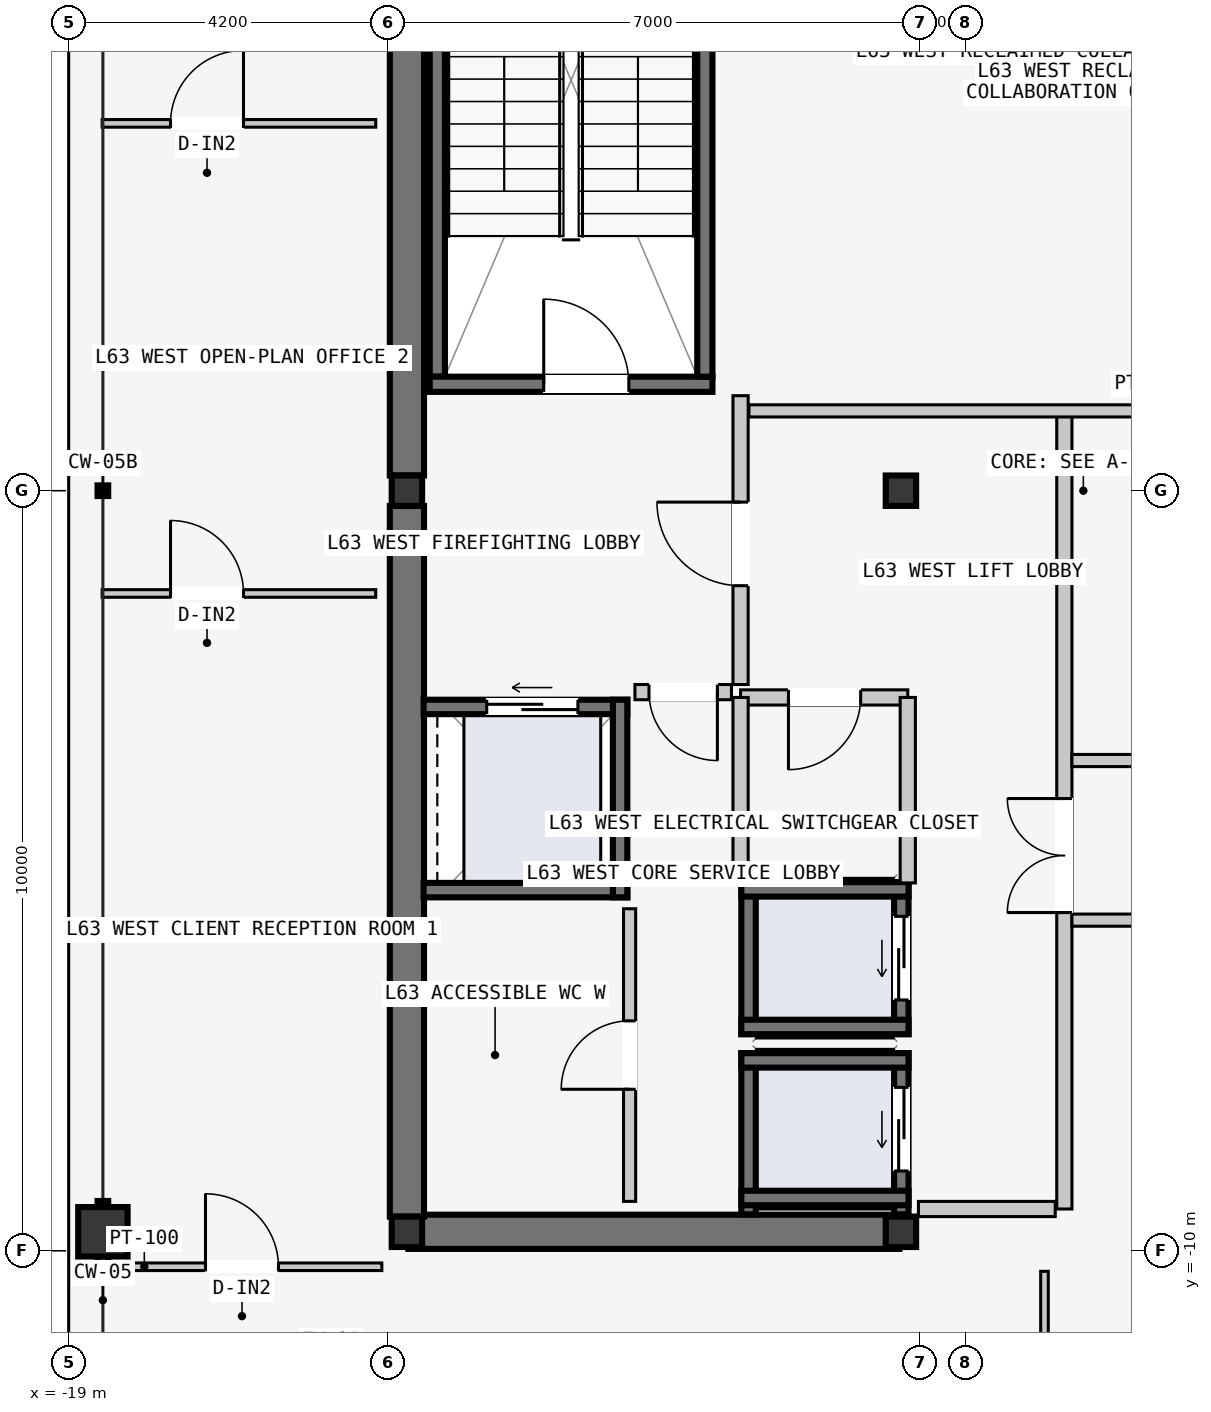
"""IFC4 building model, lengths in metres.
Left out: names, types, materials, properties, quantities, classifications, styles, units other than length and angle.
Written with IfcOpenShell. Run it as: python <this file> out.ifc"""

import sys

from ifc_helpers import new_model, si_unit, direction, frame, frame_2d, origin, origin_2d, place, context, subcontext, project, spatial, rectangle, hollow_rectangle, i_section, extrude, element, fill, save


model = new_model("IFC4")
c1 = context("Model", 3, precision=1e-05, world=origin(), true_north=direction((0.0, 1.0)))
c2 = subcontext(c1, "Body", "Model", "MODEL_VIEW")
j1 = project(units=[si_unit("LENGTHUNIT", "METRE"), si_unit("PLANEANGLEUNIT", "RADIAN")], contexts=[c1])
p1 = place(None, origin())
s1 = spatial("IfcSite", under=j1, at=p1, CompositionType="ELEMENT")
p2 = place(p1, origin())
s2 = spatial("IfcBuilding", under=s1, at=p2, CompositionType="ELEMENT")
p3 = place(p2, frame((0.0, 0.0, 240.0)))
s3 = spatial("IfcBuildingStorey", under=s2, at=p3, CompositionType="ELEMENT", Elevation=240.0)
p4 = place(p3, frame((-14.53, -9.75, -0.2), z_axis=(0.0, 0.0, 1.0), x_axis=(1.0, 0.0, 0.0)))
e1 = element("IfcWall", 1, at=p4, inside=s3, PredefinedType="SHEAR", context=c2, shape_type="SweptSolid", body=[
    extrude(rectangle(XDim=6.46, YDim=0.45, at=frame_2d((3.23, 0.0))), origin(), (0.0, 0.0, 1.0), 3.6),
])
for number, where, z_axis, x_axis in (
    (2, (-14.55, -9.55, -0.2), (0.0, 0.0, 1.0), (0.0, 1.0, 0.0)),
    (3, (-14.55, 0.2, -0.2), (0.0, 0.0, 1.0), (0.0, 1.0, 0.0)),
):
    element("IfcWall", number, at=place(p3, frame(where, z_axis=z_axis, x_axis=x_axis)), inside=s3, PredefinedType="SHEAR", context=c2, shape_type="SweptSolid", body=[
        extrude(rectangle(XDim=9.35, YDim=0.45, at=frame_2d((4.675, 0.0))), origin(), (0.0, 0.0, 1.0), 3.6),
    ])
p5 = place(p3, frame((-14.15, 1.5, -0.2), z_axis=(0.0, 0.0, 1.0), x_axis=(0.0, 1.0, 0.0)))
e4 = element("IfcWall", 4, at=p5, inside=s3, PredefinedType="SOLIDWALL", context=c2, shape_type="SweptSolid", body=[
    extrude(rectangle(XDim=7.8, YDim=0.2, at=frame_2d((3.9, 0.0))), origin(), (0.0, 0.0, 1.0), 3.6),
])
p6 = place(p3, frame((-14.25, 1.4, -0.2), z_axis=(0.0, 0.0, 1.0), x_axis=(1.0, 0.0, 0.0)))
e5 = element("IfcWall", 5, at=p6, inside=s3, PredefinedType="SOLIDWALL", context=c2, shape_type="SweptSolid", body=[
    extrude(rectangle(XDim=3.72, YDim=0.2, at=frame_2d((1.86, 0.0))), origin(), (0.0, 0.0, 1.0), 3.6),
])
p7 = place(p6, frame((1.5, 0.0, 0.2)))
e6 = element("IfcOpeningElement", 6, at=p7, cuts=e5, PredefinedType="OPENING", context=c2, shape_type="SweptSolid", body=[
    extrude(rectangle(XDim=1.12, YDim=2.18, at=frame_2d((0.56, 1.09))), frame((0.0, 0.11, 0.0), z_axis=(0.0, -1.0, 0.0), x_axis=(1.0, 0.0, 0.0)), (0.0, 0.0, 1.0), 0.22),
])
p8 = place(p3, frame((-10.63, 1.5, -0.2), z_axis=(0.0, 0.0, 1.0), x_axis=(0.0, 1.0, 0.0)))
e7 = element("IfcWall", 7, at=p8, inside=s3, PredefinedType="SOLIDWALL", context=c2, shape_type="SweptSolid", body=[
    extrude(rectangle(XDim=7.8, YDim=0.2, at=frame_2d((3.9, 0.0))), origin(), (0.0, 0.0, 1.0), 3.6),
])
for number, where, z_axis, x_axis in (
    (8, (-14.55, -9.75, 0.0), (0.0, 0.0, 1.0), (1.0, 0.0, 0.0)),
    (9, (-14.55, 0.0, 0.0), (0.0, 0.0, 1.0), (1.0, 0.0, 0.0)),
    (10, (-8.05, -9.75, 0.0), (0.0, 0.0, 1.0), (1.0, 0.0, 0.0)),
    (11, (-8.05, 0.0, 0.0), (0.0, 0.0, 1.0), (1.0, 0.0, 0.0)),
):
    element("IfcColumn", number, at=place(p3, frame(where, z_axis=z_axis, x_axis=x_axis)), inside=s3, PredefinedType="COLUMN", context=c2, shape_type="SweptSolid", body=[
        extrude(i_section(OverallWidth=0.4, OverallDepth=0.4, WebThickness=0.013, FlangeThickness=0.021, at=origin_2d()), origin(), (0.0, 0.0, 1.0), 3.6),
    ])
p9 = place(p3, frame((-18.55, -9.75, 0.0), z_axis=(0.0, 0.0, 1.0), x_axis=(0.0, 1.0, 0.0)))
e12 = element("IfcColumn", 12, at=p9, inside=s3, PredefinedType="COLUMN", context=c2, shape_type="SweptSolid", body=[
    extrude(hollow_rectangle(XDim=0.65, YDim=0.65, WallThickness=0.028, at=origin_2d()), origin(), (0.0, 0.0, 1.0), 3.6),
])
p10 = place(p3, frame((-8.045, -9.52, -0.2), z_axis=(0.0, 0.0, 1.0), x_axis=(0.0, 1.0, 0.0)))
e13 = element("IfcWall", 13, at=p10, inside=s3, PredefinedType="SOLIDWALL", context=c2, shape_type="SweptSolid", body=[
    extrude(rectangle(XDim=2.12, YDim=0.19, at=frame_2d((1.06, 0.0))), origin(), (0.0, 0.0, 1.0), 3.6),
])
p11 = place(p10, frame((0.57, 0.0, 0.2)))
e14 = element("IfcOpeningElement", 14, at=p11, cuts=e13, PredefinedType="OPENING", context=c2, shape_type="SweptSolid", body=[
    extrude(rectangle(XDim=1.1, YDim=2.2, at=frame_2d((0.55, 1.1))), frame((0.0, 0.105, 0.0), z_axis=(0.0, -1.0, 0.0), x_axis=(1.0, 0.0, 0.0)), (0.0, 0.0, 1.0), 0.21),
])
p12 = place(p3, frame((-10.055, -9.52, -0.2), z_axis=(0.0, 0.0, 1.0), x_axis=(0.0, 1.0, 0.0)))
e15 = element("IfcWall", 15, at=p12, inside=s3, PredefinedType="SOLIDWALL", context=c2, shape_type="SweptSolid", body=[
    extrude(rectangle(XDim=2.12, YDim=0.19, at=frame_2d((1.06, 0.0))), origin(), (0.0, 0.0, 1.0), 3.6),
])
for number, where, z_axis, x_axis in (
    (16, (-10.15, -7.495, -0.2), (0.0, 0.0, 1.0), (1.0, 0.0, 0.0)),
    (17, (-10.15, -9.305, -0.2), (0.0, 0.0, 1.0), (1.0, 0.0, 0.0)),
):
    element("IfcWall", number, at=place(p3, frame(where, z_axis=z_axis, x_axis=x_axis)), inside=s3, PredefinedType="SOLIDWALL", context=c2, shape_type="SweptSolid", body=[
        extrude(rectangle(XDim=2.2, YDim=0.19, at=frame_2d((1.1, 0.0))), origin(), (0.0, 0.0, 1.0), 3.6),
    ])
p13 = place(p3, frame((-8.045, -7.15, -0.2), z_axis=(0.0, 0.0, 1.0), x_axis=(0.0, 1.0, 0.0)))
e18 = element("IfcWall", 18, at=p13, inside=s3, PredefinedType="SOLIDWALL", context=c2, shape_type="SweptSolid", body=[
    extrude(rectangle(XDim=2.0, YDim=0.19, at=frame_2d((1.0, 0.0))), origin(), (0.0, 0.0, 1.0), 3.6),
])
p14 = place(p13, frame((0.45, 0.0, 0.2)))
e19 = element("IfcOpeningElement", 19, at=p14, cuts=e18, PredefinedType="OPENING", context=c2, shape_type="SweptSolid", body=[
    extrude(rectangle(XDim=1.1, YDim=2.2, at=frame_2d((0.55, 1.1))), frame((0.0, 0.105, 0.0), z_axis=(0.0, -1.0, 0.0), x_axis=(1.0, 0.0, 0.0)), (0.0, 0.0, 1.0), 0.21),
])
p15 = place(p3, frame((-10.055, -7.15, -0.2), z_axis=(0.0, 0.0, 1.0), x_axis=(0.0, 1.0, 0.0)))
e20 = element("IfcWall", 20, at=p15, inside=s3, PredefinedType="SOLIDWALL", context=c2, shape_type="SweptSolid", body=[
    extrude(rectangle(XDim=2.0, YDim=0.19, at=frame_2d((1.0, 0.0))), origin(), (0.0, 0.0, 1.0), 3.6),
])
for number, where, z_axis, x_axis in (
    (21, (-10.15, -5.245, -0.2), (0.0, 0.0, 1.0), (1.0, 0.0, 0.0)),
    (22, (-10.15, -7.055, -0.2), (0.0, 0.0, 1.0), (1.0, 0.0, 0.0)),
):
    element("IfcWall", number, at=place(p3, frame(where, z_axis=z_axis, x_axis=x_axis)), inside=s3, PredefinedType="SOLIDWALL", context=c2, shape_type="SweptSolid", body=[
        extrude(rectangle(XDim=2.2, YDim=0.19, at=frame_2d((1.1, 0.0))), origin(), (0.0, 0.0, 1.0), 3.6),
    ])
p16 = place(p3, frame((-14.33, -2.845, -0.2), z_axis=(0.0, 0.0, 1.0), x_axis=(1.0, 0.0, 0.0)))
e23 = element("IfcWall", 23, at=p16, inside=s3, PredefinedType="SOLIDWALL", context=c2, shape_type="SweptSolid", body=[
    extrude(rectangle(XDim=2.68, YDim=0.19, at=frame_2d((1.34, 0.0))), origin(), (0.0, 0.0, 1.0), 3.6),
])
p17 = place(p16, frame((0.83, 0.0, 0.2)))
e24 = element("IfcOpeningElement", 24, at=p17, cuts=e23, PredefinedType="OPENING", context=c2, shape_type="SweptSolid", body=[
    extrude(rectangle(XDim=1.2, YDim=2.2, at=frame_2d((0.6, 1.1))), frame((0.0, 0.105, 0.0), z_axis=(0.0, -1.0, 0.0), x_axis=(1.0, 0.0, 0.0)), (0.0, 0.0, 1.0), 0.21),
])
p18 = place(p3, frame((-14.33, -5.255, -0.2), z_axis=(0.0, 0.0, 1.0), x_axis=(1.0, 0.0, 0.0)))
e25 = element("IfcWall", 25, at=p18, inside=s3, PredefinedType="SOLIDWALL", context=c2, shape_type="SweptSolid", body=[
    extrude(rectangle(XDim=2.68, YDim=0.19, at=frame_2d((1.34, 0.0))), origin(), (0.0, 0.0, 1.0), 3.6),
])
p19 = place(p3, frame((-11.745, -5.35, -0.2), z_axis=(0.0, 0.0, 1.0), x_axis=(0.0, 1.0, 0.0)))
e26 = element("IfcWall", 26, at=p19, inside=s3, PredefinedType="SOLIDWALL", context=c2, shape_type="SweptSolid", body=[
    extrude(rectangle(XDim=2.6, YDim=0.19, at=frame_2d((1.3, 0.0))), origin(), (0.0, 0.0, 1.0), 3.6),
])
p20 = place(p3, frame((-5.9, -9.45, 0.0), z_axis=(0.0, 0.0, 1.0), x_axis=(0.0, 1.0, 0.0)))
e27 = element("IfcWall", 27, at=p20, inside=s3, PredefinedType="PARTITIONING", context=c2, shape_type="SweptSolid", body=[
    extrude(rectangle(XDim=10.5, YDim=0.2, at=frame_2d((5.25, 0.0))), origin(), (0.0, 0.0, 1.0), 3.4),
])
p21 = place(p20, frame((3.9, 0.0, 0.0)))
e28 = element("IfcOpeningElement", 28, at=p21, cuts=e27, PredefinedType="OPENING", context=c2, shape_type="SweptSolid", body=[
    extrude(rectangle(XDim=1.5, YDim=2.2, at=frame_2d((0.75, 1.1))), frame((0.0, 0.11, 0.0), z_axis=(0.0, -1.0, 0.0), x_axis=(1.0, 0.0, 0.0)), (0.0, 0.0, 1.0), 0.22),
])
p22 = place(p3, frame((-6.02, -9.45, 0.0), z_axis=(0.0, 0.0, 1.0), x_axis=(-1.0, 0.0, 0.0)))
e29 = element("IfcWall", 29, at=p22, inside=s3, PredefinedType="PARTITIONING", context=c2, shape_type="SweptSolid", body=[
    extrude(rectangle(XDim=1.8, YDim=0.2, at=frame_2d((0.9, 0.0))), origin(), (0.0, 0.0, 1.0), 3.4),
])
p23 = place(p3, frame((-10.16, -2.55, 0.0), z_axis=(0.0, 0.0, 1.0), x_axis=(0.0, 1.0, 0.0)))
e30 = element("IfcWall", 30, at=p23, inside=s3, PredefinedType="PARTITIONING", context=c2, shape_type="SweptSolid", body=[
    extrude(rectangle(XDim=3.8, YDim=0.2, at=frame_2d((1.9, 0.0))), origin(), (0.0, 0.0, 1.0), 3.4),
])
p24 = place(p23, frame((1.3, 0.0, 0.0)))
e31 = element("IfcOpeningElement", 31, at=p24, cuts=e30, PredefinedType="OPENING", context=c2, shape_type="SweptSolid", body=[
    extrude(rectangle(XDim=1.1, YDim=2.15, at=frame_2d((0.55, 1.075))), frame((0.0, 0.11, 0.0), z_axis=(0.0, -1.0, 0.0), x_axis=(1.0, 0.0, 0.0)), (0.0, 0.0, 1.0), 0.22),
])
p25 = place(p3, frame((-10.28, -2.65, 0.0), z_axis=(0.0, 0.0, 1.0), x_axis=(-1.0, 0.0, 0.0)))
e32 = element("IfcWall", 32, at=p25, inside=s3, PredefinedType="PARTITIONING", context=c2, shape_type="SweptSolid", body=[
    extrude(rectangle(XDim=1.27, YDim=0.2, at=frame_2d((0.635, 0.0))), origin(), (0.0, 0.0, 1.0), 3.4),
])
p26 = place(p25, frame((0.185, 0.0, 0.0)))
e33 = element("IfcOpeningElement", 33, at=p26, cuts=e32, PredefinedType="OPENING", context=c2, shape_type="SweptSolid", body=[
    extrude(rectangle(XDim=0.9, YDim=2.15, at=frame_2d((0.45, 1.075))), frame((0.0, 0.11, 0.0), z_axis=(0.0, -1.0, 0.0), x_axis=(1.0, 0.0, 0.0)), (0.0, 0.0, 1.0), 0.22),
])
p27 = place(p3, frame((-7.96, -2.72, 0.0), z_axis=(0.0, 0.0, 1.0), x_axis=(-1.0, 0.0, 0.0)))
e34 = element("IfcWall", 34, at=p27, inside=s3, PredefinedType="PARTITIONING", context=c2, shape_type="SweptSolid", body=[
    extrude(rectangle(XDim=2.2, YDim=0.2, at=frame_2d((1.1, 0.0))), origin(), (0.0, 0.0, 1.0), 3.4),
])
p28 = place(p27, frame((0.62, 0.0, 0.0)))
e35 = element("IfcOpeningElement", 35, at=p28, cuts=e34, PredefinedType="OPENING", context=c2, shape_type="SweptSolid", body=[
    extrude(rectangle(XDim=0.95, YDim=2.1, at=frame_2d((0.475, 1.05))), frame((0.0, 0.11, 0.0), z_axis=(0.0, -1.0, 0.0), x_axis=(1.0, 0.0, 0.0)), (0.0, 0.0, 1.0), 0.22),
])
for number, where, z_axis, x_axis in (
    (36, (-7.96, -5.16, 0.0), (0.0, 0.0, 1.0), (0.0, 1.0, 0.0)),
    (37, (-10.16, -5.16, 0.0), (0.0, 0.0, 1.0), (0.0, 1.0, 0.0)),
):
    element("IfcWall", number, at=place(p3, frame(where, z_axis=z_axis, x_axis=x_axis)), inside=s3, PredefinedType="PARTITIONING", context=c2, shape_type="SweptSolid", body=[
        extrude(rectangle(XDim=2.44, YDim=0.2, at=frame_2d((1.22, 0.0))), origin(), (0.0, 0.0, 1.0), 3.4),
    ])
p29 = place(p3, frame((-11.62, -9.35, 0.0), z_axis=(0.0, 0.0, 1.0), x_axis=(0.0, 1.0, 0.0)))
e38 = element("IfcWall", 38, at=p29, inside=s3, PredefinedType="PARTITIONING", context=c2, shape_type="SweptSolid", body=[
    extrude(rectangle(XDim=3.85, YDim=0.16, at=frame_2d((1.925, 0.0))), origin(), (0.0, 0.0, 1.0), 3.4),
])
p30 = place(p29, frame((1.475, 0.0, 0.0)))
e39 = element("IfcOpeningElement", 39, at=p30, cuts=e38, PredefinedType="OPENING", context=c2, shape_type="SweptSolid", body=[
    extrude(rectangle(XDim=0.9, YDim=2.15, at=frame_2d((0.45, 1.075))), frame((0.0, 0.09, 0.0), z_axis=(0.0, -1.0, 0.0), x_axis=(1.0, 0.0, 0.0)), (0.0, 0.0, 1.0), 0.18),
])
p31 = place(p3, frame((-10.05, 1.05, 0.0), z_axis=(0.0, 0.0, 1.0), x_axis=(1.0, 0.0, 0.0)))
e40 = element("IfcWall", 40, at=p31, inside=s3, PredefinedType="PARTITIONING", context=c2, shape_type="SweptSolid", body=[
    extrude(rectangle(XDim=10.54, YDim=0.16, at=frame_2d((5.27, 0.0))), origin(), (0.0, 0.0, 1.0), 3.4),
])
for number, where, z_axis, x_axis in (
    (41, (-5.8, -3.55, 0.0), (0.0, 0.0, 1.0), (1.0, 0.0, 0.0)),
    (42, (-5.8, -5.65, 0.0), (0.0, 0.0, 1.0), (1.0, 0.0, 0.0)),
):
    element("IfcWall", number, at=place(p3, frame(where, z_axis=z_axis, x_axis=x_axis)), inside=s3, PredefinedType="PARTITIONING", context=c2, shape_type="SweptSolid", body=[
        extrude(rectangle(XDim=6.29, YDim=0.16, at=frame_2d((3.145, 0.0))), origin(), (0.0, 0.0, 1.0), 3.4),
    ])
p32 = place(p3, frame((-6.161, -17.56, 0.0), z_axis=(0.0, 0.0, 1.0), x_axis=(0.0, 1.0, 0.0)))
e43 = element("IfcWall", 43, at=p32, inside=s3, PredefinedType="PARTITIONING", context=c2, shape_type="SweptSolid", body=[
    extrude(rectangle(XDim=7.29, YDim=0.1, at=frame_2d((3.645, 0.0))), origin(), (0.0, 0.0, 1.0), 3.4),
])
p33 = place(p32, frame((1.05, 0.0, 0.0)))
e44 = element("IfcOpeningElement", 44, at=p33, cuts=e43, PredefinedType="OPENING", context=c2, shape_type="SweptSolid", body=[
    extrude(rectangle(XDim=0.96, YDim=2.18, at=frame_2d((0.48, 1.09))), frame((0.0, 0.06, 0.0), z_axis=(0.0, -1.0, 0.0), x_axis=(1.0, 0.0, 0.0)), (0.0, 0.0, 1.0), 0.12),
])
p34 = place(p3, frame((-18.56, -10.21, 0.0), z_axis=(0.0, 0.0, 1.0), x_axis=(1.0, 0.0, 0.0)))
e45 = element("IfcWall", 45, at=p34, inside=s3, PredefinedType="PARTITIONING", context=c2, shape_type="SweptSolid", body=[
    extrude(rectangle(XDim=3.68, YDim=0.1, at=frame_2d((1.84, 0.0))), origin(), (0.0, 0.0, 1.0), 3.4),
])
p35 = place(p34, frame((1.36, 0.0, 0.0)))
e46 = element("IfcOpeningElement", 46, at=p35, cuts=e45, PredefinedType="OPENING", context=c2, shape_type="SweptSolid", body=[
    extrude(rectangle(XDim=0.96, YDim=2.18, at=frame_2d((0.48, 1.09))), frame((0.0, 0.06, 0.0), z_axis=(0.0, -1.0, 0.0), x_axis=(1.0, 0.0, 0.0)), (0.0, 0.0, 1.0), 0.12),
])
p36 = place(p3, frame((-18.56, -1.352, 0.0), z_axis=(0.0, 0.0, 1.0), x_axis=(1.0, 0.0, 0.0)))
e47 = element("IfcWall", 47, at=p36, inside=s3, PredefinedType="PARTITIONING", context=c2, shape_type="SweptSolid", body=[
    extrude(rectangle(XDim=3.6, YDim=0.1, at=frame_2d((1.8, 0.0))), origin(), (0.0, 0.0, 1.0), 3.4),
])
p37 = place(p36, frame((0.9, 0.0, 0.0)))
e48 = element("IfcOpeningElement", 48, at=p37, cuts=e47, PredefinedType="OPENING", context=c2, shape_type="SweptSolid", body=[
    extrude(rectangle(XDim=0.96, YDim=2.18, at=frame_2d((0.48, 1.09))), frame((0.0, 0.06, 0.0), z_axis=(0.0, -1.0, 0.0), x_axis=(1.0, 0.0, 0.0)), (0.0, 0.0, 1.0), 0.12),
])
p38 = place(p3, frame((-18.56, 4.833, 0.0), z_axis=(0.0, 0.0, 1.0), x_axis=(1.0, 0.0, 0.0)))
e49 = element("IfcWall", 49, at=p38, inside=s3, PredefinedType="PARTITIONING", context=c2, shape_type="SweptSolid", body=[
    extrude(rectangle(XDim=3.6, YDim=0.1, at=frame_2d((1.8, 0.0))), origin(), (0.0, 0.0, 1.0), 3.4),
])
p39 = place(p38, frame((0.9, 0.0, 0.0)))
e50 = element("IfcOpeningElement", 50, at=p39, cuts=e49, PredefinedType="OPENING", context=c2, shape_type="SweptSolid", body=[
    extrude(rectangle(XDim=0.96, YDim=2.18, at=frame_2d((0.48, 1.09))), frame((0.0, 0.06, 0.0), z_axis=(0.0, -1.0, 0.0), x_axis=(1.0, 0.0, 0.0)), (0.0, 0.0, 1.0), 0.12),
])
p40 = place(p7, origin())
e51 = element("IfcDoor", 51, at=p40, inside=s3, OperationType="SINGLE_SWING_LEFT", PredefinedType="DOOR", context=c2, shape_type="SweptSolid", body=[
    extrude(rectangle(XDim=1.12, YDim=2.18, at=frame_2d((0.56, 1.09))), frame((0.0, 0.025, 0.0), z_axis=(0.0, -1.0, 0.0), x_axis=(1.0, 0.0, 0.0)), (0.0, 0.0, 1.0), 0.05),
])
fill(e6, e51)
p41 = place(p11, origin())
e52 = element("IfcDoor", 52, at=p41, inside=s3, OperationType="SLIDING_TO_LEFT", PredefinedType="DOOR", context=c2, shape_type="SweptSolid", body=[
    extrude(rectangle(XDim=1.1, YDim=2.2, at=frame_2d((0.55, 1.1))), frame((0.0, 0.025, 0.0), z_axis=(0.0, -1.0, 0.0), x_axis=(1.0, 0.0, 0.0)), (0.0, 0.0, 1.0), 0.05),
])
fill(e14, e52)
p42 = place(p14, origin())
e53 = element("IfcDoor", 53, at=p42, inside=s3, OperationType="SLIDING_TO_LEFT", PredefinedType="DOOR", context=c2, shape_type="SweptSolid", body=[
    extrude(rectangle(XDim=1.1, YDim=2.2, at=frame_2d((0.55, 1.1))), frame((0.0, 0.025, 0.0), z_axis=(0.0, -1.0, 0.0), x_axis=(1.0, 0.0, 0.0)), (0.0, 0.0, 1.0), 0.05),
])
fill(e19, e53)
p43 = place(p17, origin())
e54 = element("IfcDoor", 54, at=p43, inside=s3, OperationType="SLIDING_TO_LEFT", PredefinedType="DOOR", context=c2, shape_type="SweptSolid", body=[
    extrude(rectangle(XDim=1.2, YDim=2.2, at=frame_2d((0.6, 1.1))), frame((0.0, 0.025, 0.0), z_axis=(0.0, -1.0, 0.0), x_axis=(1.0, 0.0, 0.0)), (0.0, 0.0, 1.0), 0.05),
])
fill(e24, e54)
p44 = place(p21, origin())
e55 = element("IfcDoor", 55, at=p44, inside=s3, OperationType="DOUBLE_DOOR_SINGLE_SWING", PredefinedType="DOOR", context=c2, shape_type="SweptSolid", body=[
    extrude(rectangle(XDim=1.5, YDim=2.2, at=frame_2d((0.75, 1.1))), frame((0.0, 0.025, 0.0), z_axis=(0.0, -1.0, 0.0), x_axis=(1.0, 0.0, 0.0)), (0.0, 0.0, 1.0), 0.05),
])
fill(e28, e55)
p45 = place(p24, origin())
e56 = element("IfcDoor", 56, at=p45, inside=s3, OperationType="SINGLE_SWING_RIGHT", PredefinedType="DOOR", context=c2, shape_type="SweptSolid", body=[
    extrude(rectangle(XDim=1.1, YDim=2.15, at=frame_2d((0.55, 1.075))), frame((0.0, 0.025, 0.0), z_axis=(0.0, -1.0, 0.0), x_axis=(1.0, 0.0, 0.0)), (0.0, 0.0, 1.0), 0.05),
])
fill(e31, e56)
p46 = place(p26, origin())
e57 = element("IfcDoor", 57, at=p46, inside=s3, OperationType="SINGLE_SWING_LEFT", PredefinedType="DOOR", context=c2, shape_type="SweptSolid", body=[
    extrude(rectangle(XDim=0.9, YDim=2.15, at=frame_2d((0.45, 1.075))), frame((0.0, 0.025, 0.0), z_axis=(0.0, -1.0, 0.0), x_axis=(1.0, 0.0, 0.0)), (0.0, 0.0, 1.0), 0.05),
])
fill(e33, e57)
p47 = place(p28, origin())
e58 = element("IfcDoor", 58, at=p47, inside=s3, OperationType="SINGLE_SWING_RIGHT", PredefinedType="DOOR", context=c2, shape_type="SweptSolid", body=[
    extrude(rectangle(XDim=0.95, YDim=2.1, at=frame_2d((0.475, 1.05))), frame((0.0, 0.025, 0.0), z_axis=(0.0, -1.0, 0.0), x_axis=(1.0, 0.0, 0.0)), (0.0, 0.0, 1.0), 0.05),
])
fill(e35, e58)
p48 = place(p30, origin())
e59 = element("IfcDoor", 59, at=p48, inside=s3, OperationType="SINGLE_SWING_LEFT", PredefinedType="DOOR", context=c2, shape_type="SweptSolid", body=[
    extrude(rectangle(XDim=0.9, YDim=2.15, at=frame_2d((0.45, 1.075))), frame((0.0, 0.025, 0.0), z_axis=(0.0, -1.0, 0.0), x_axis=(1.0, 0.0, 0.0)), (0.0, 0.0, 1.0), 0.05),
])
fill(e39, e59)
p49 = place(p35, origin())
e60 = element("IfcDoor", 60, at=p49, inside=s3, OperationType="SINGLE_SWING_LEFT", PredefinedType="DOOR", context=c2, shape_type="SweptSolid", body=[
    extrude(rectangle(XDim=0.96, YDim=2.18, at=frame_2d((0.48, 1.09))), frame((0.0, 0.025, 0.0), z_axis=(0.0, -1.0, 0.0), x_axis=(1.0, 0.0, 0.0)), (0.0, 0.0, 1.0), 0.05),
])
fill(e46, e60)
p50 = place(p37, origin())
e61 = element("IfcDoor", 61, at=p50, inside=s3, OperationType="SINGLE_SWING_LEFT", PredefinedType="DOOR", context=c2, shape_type="SweptSolid", body=[
    extrude(rectangle(XDim=0.96, YDim=2.18, at=frame_2d((0.48, 1.09))), frame((0.0, 0.025, 0.0), z_axis=(0.0, -1.0, 0.0), x_axis=(1.0, 0.0, 0.0)), (0.0, 0.0, 1.0), 0.05),
])
fill(e48, e61)
p51 = place(p39, origin())
e62 = element("IfcDoor", 62, at=p51, inside=s3, OperationType="SINGLE_SWING_RIGHT", PredefinedType="DOOR", context=c2, shape_type="SweptSolid", body=[
    extrude(rectangle(XDim=0.96, YDim=2.18, at=frame_2d((0.48, 1.09))), frame((0.0, 0.025, 0.0), z_axis=(0.0, -1.0, 0.0), x_axis=(1.0, 0.0, 0.0)), (0.0, 0.0, 1.0), 0.05),
])
fill(e50, e62)
save(model, sys.argv[1])
